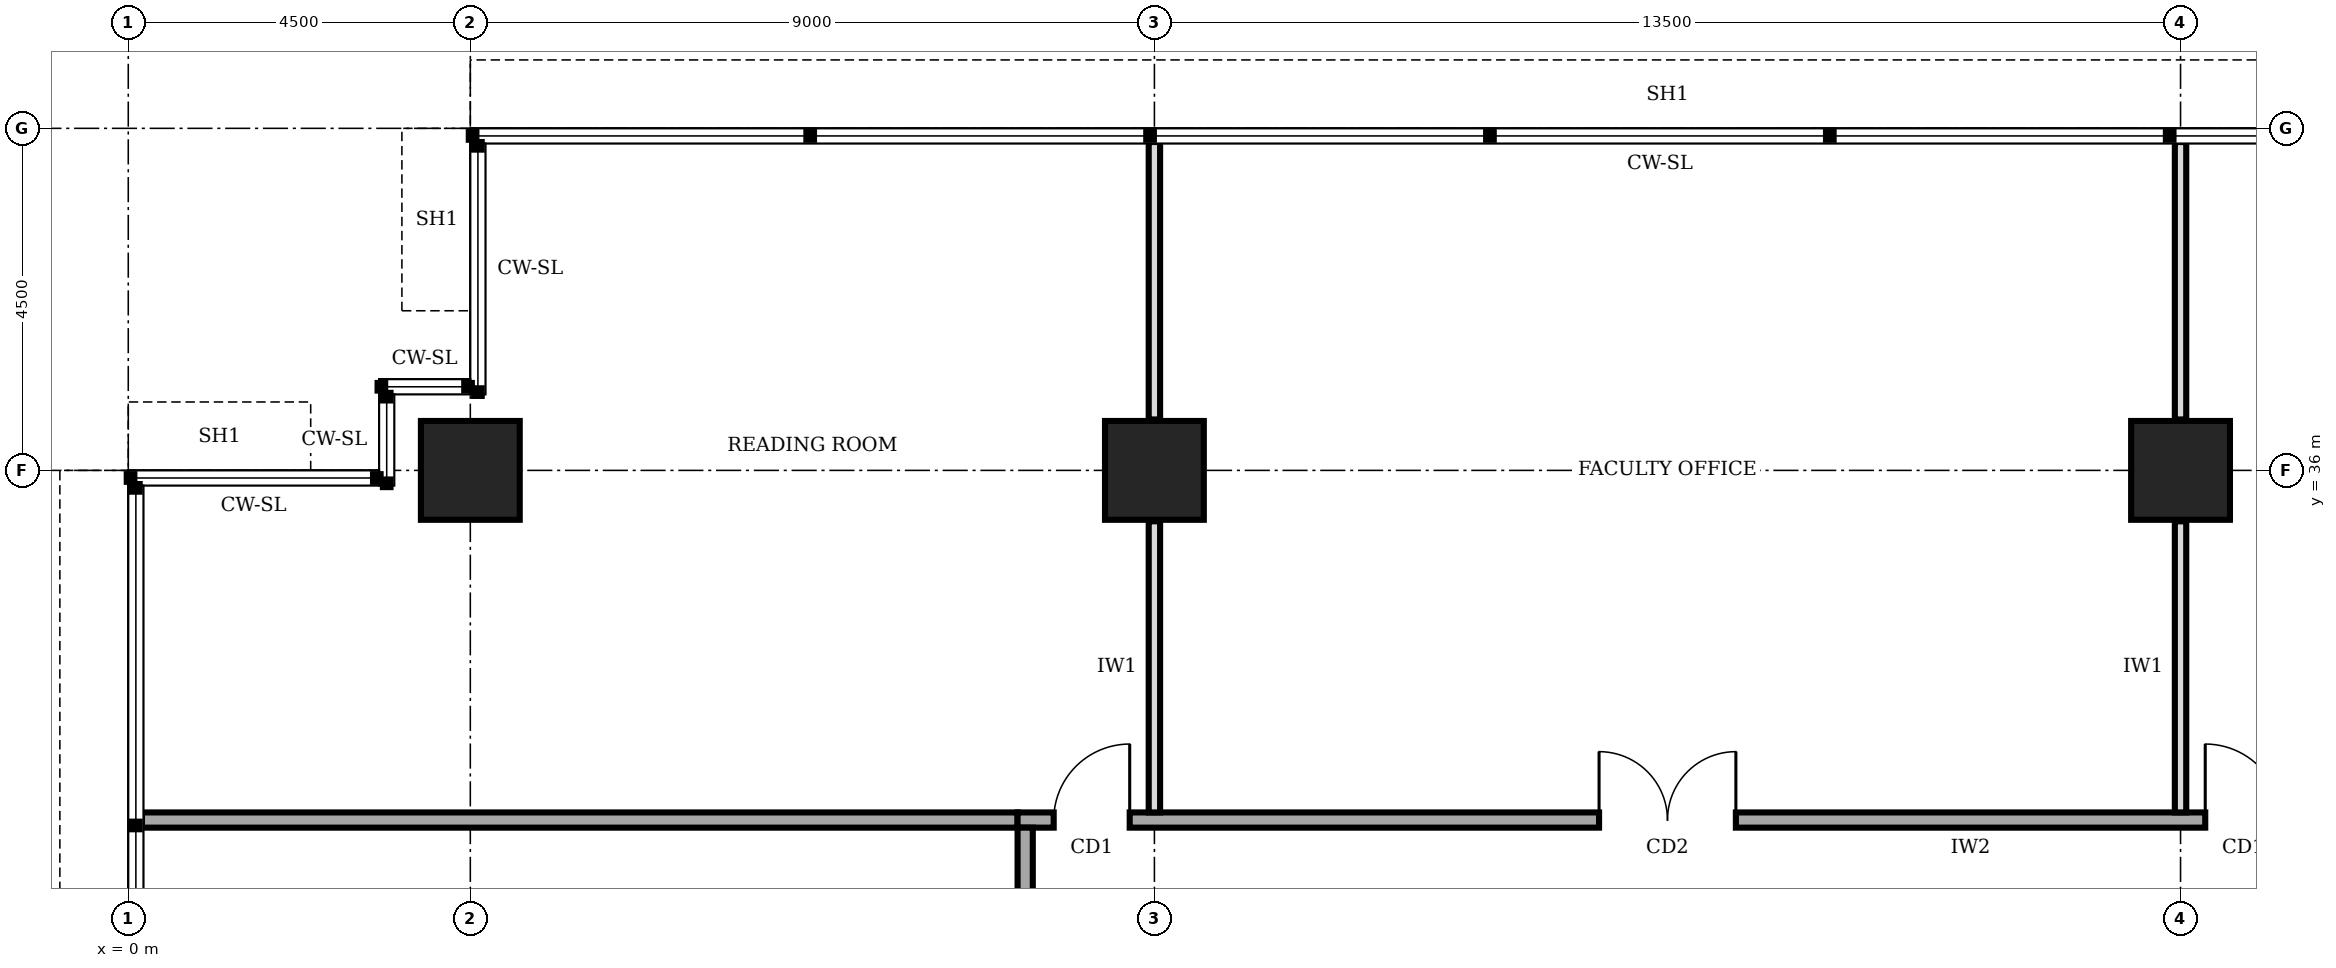
"""IFC4 building model, lengths in metres.
Left out: names, types, materials, properties, quantities, classifications, styles, units other than length and angle.
Written with IfcOpenShell. Run it as: python <this file> out.ifc"""

import sys

from ifc_helpers import new_model, si_unit, direction, frame, frame_2d, origin, origin_2d, place, context, subcontext, project, spatial, rectangle, extrude, element, fill, save


model = new_model("IFC4")
c1 = context("Model", 3, precision=1e-05, world=origin(), true_north=direction((0.0, 1.0)))
c2 = subcontext(c1, "Body", "Model", "MODEL_VIEW")
j1 = project(units=[si_unit("LENGTHUNIT", "METRE"), si_unit("PLANEANGLEUNIT", "RADIAN")], contexts=[c1])
p1 = place(None, origin())
s1 = spatial("IfcSite", under=j1, at=p1, CompositionType="ELEMENT")
p2 = place(p1, origin())
s2 = spatial("IfcBuilding", under=s1, at=p2, CompositionType="ELEMENT")
p3 = place(p2, frame((0.0, 0.0, 293.0)))
s3 = spatial("IfcBuildingStorey", under=s2, at=p3, CompositionType="ELEMENT", Elevation=293.0)
for number, where, z_axis, x_axis in (
    (1, (4.5, 36.0, 0.0), (0.0, 0.0, 1.0), (1.0, 0.0, 0.0)),
    (2, (13.5, 36.0, 0.0), (0.0, 0.0, 1.0), (1.0, 0.0, 0.0)),
    (3, (27.0, 36.0, 0.0), (0.0, 0.0, 1.0), (1.0, 0.0, 0.0)),
):
    element("IfcColumn", number, at=place(p3, frame(where, z_axis=z_axis, x_axis=x_axis)), inside=s3, PredefinedType="COLUMN", context=c2, shape_type="SweptSolid", body=[
        extrude(rectangle(XDim=1.3, YDim=1.3, at=origin_2d()), origin(), (0.0, 0.0, 1.0), 4.0),
    ])
p4 = place(p3, frame((28.6, 31.4, 0.0), z_axis=(0.0, 0.0, 1.0), x_axis=(-1.0, 0.0, 0.0)))
e4 = element("IfcWall", 4, at=p4, inside=s3, PredefinedType="SOLIDWALL", context=c2, shape_type="SweptSolid", body=[
    extrude(rectangle(XDim=16.9, YDim=0.2, at=frame_2d((8.45, 0.0))), origin(), (0.0, 0.0, 1.0), 3.75),
])
p5 = place(p4, frame((15.425, 0.0, 0.0)))
e5 = element("IfcOpeningElement", 5, at=p5, cuts=e4, PredefinedType="OPENING", context=c2, shape_type="SweptSolid", body=[
    extrude(rectangle(XDim=1.0, YDim=2.1, at=frame_2d((0.5, 1.05))), frame((0.0, 0.11, 0.0), z_axis=(0.0, -1.0, 0.0), x_axis=(1.0, 0.0, 0.0)), (0.0, 0.0, 1.0), 0.22),
])
p6 = place(p4, frame((7.45, 0.0, 0.0)))
e6 = element("IfcOpeningElement", 6, at=p6, cuts=e4, PredefinedType="OPENING", context=c2, shape_type="SweptSolid", body=[
    extrude(rectangle(XDim=1.8, YDim=2.1, at=frame_2d((0.9, 1.05))), frame((0.0, 0.11, 0.0), z_axis=(0.0, -1.0, 0.0), x_axis=(1.0, 0.0, 0.0)), (0.0, 0.0, 1.0), 0.22),
])
p7 = place(p4, frame((0.275, 0.0, 0.0)))
e7 = element("IfcOpeningElement", 7, at=p7, cuts=e4, PredefinedType="OPENING", context=c2, shape_type="SweptSolid", body=[
    extrude(rectangle(XDim=1.0, YDim=2.1, at=frame_2d((0.5, 1.05))), frame((0.0, 0.11, 0.0), z_axis=(0.0, -1.0, 0.0), x_axis=(1.0, 0.0, 0.0)), (0.0, 0.0, 1.0), 0.22),
])
p8 = place(p3, frame((11.8, 31.3, 0.0), z_axis=(0.0, 0.0, 1.0), x_axis=(0.0, -1.0, 0.0)))
e8 = element("IfcWall", 8, at=p8, inside=s3, PredefinedType="SOLIDWALL", context=c2, shape_type="SweptSolid", body=[
    extrude(rectangle(XDim=22.3, YDim=0.2, at=frame_2d((11.15, 0.0))), origin(), (0.0, 0.0, 1.0), 3.75),
])
p9 = place(p8, frame((19.55, 0.0, 0.0)))
e9 = element("IfcOpeningElement", 9, at=p9, cuts=e8, PredefinedType="OPENING", context=c2, shape_type="SweptSolid", body=[
    extrude(rectangle(XDim=1.0, YDim=2.1, at=frame_2d((0.5, 1.05))), frame((0.0, 0.11, 0.0), z_axis=(0.0, -1.0, 0.0), x_axis=(1.0, 0.0, 0.0)), (0.0, 0.0, 1.0), 0.22),
])
p10 = place(p8, frame((15.45, 0.0, 0.0)))
e10 = element("IfcOpeningElement", 10, at=p10, cuts=e8, PredefinedType="OPENING", context=c2, shape_type="SweptSolid", body=[
    extrude(rectangle(XDim=0.9, YDim=2.1, at=frame_2d((0.45, 1.05))), frame((0.0, 0.11, 0.0), z_axis=(0.0, -1.0, 0.0), x_axis=(1.0, 0.0, 0.0)), (0.0, 0.0, 1.0), 0.22),
])
p11 = place(p8, frame((12.45, 0.0, 0.0)))
e11 = element("IfcOpeningElement", 11, at=p11, cuts=e8, PredefinedType="OPENING", context=c2, shape_type="SweptSolid", body=[
    extrude(rectangle(XDim=0.9, YDim=2.1, at=frame_2d((0.45, 1.05))), frame((0.0, 0.11, 0.0), z_axis=(0.0, -1.0, 0.0), x_axis=(1.0, 0.0, 0.0)), (0.0, 0.0, 1.0), 0.22),
])
p12 = place(p8, frame((7.6, 0.0, 0.0)))
e12 = element("IfcOpeningElement", 12, at=p12, cuts=e8, PredefinedType="OPENING", context=c2, shape_type="SweptSolid", body=[
    extrude(rectangle(XDim=0.9, YDim=2.1, at=frame_2d((0.45, 1.05))), frame((0.0, 0.11, 0.0), z_axis=(0.0, -1.0, 0.0), x_axis=(1.0, 0.0, 0.0)), (0.0, 0.0, 1.0), 0.22),
])
p13 = place(p8, frame((4.8, 0.0, 0.0)))
e13 = element("IfcOpeningElement", 13, at=p13, cuts=e8, PredefinedType="OPENING", context=c2, shape_type="SweptSolid", body=[
    extrude(rectangle(XDim=1.0, YDim=2.1, at=frame_2d((0.5, 1.05))), frame((0.0, 0.11, 0.0), z_axis=(0.0, -1.0, 0.0), x_axis=(1.0, 0.0, 0.0)), (0.0, 0.0, 1.0), 0.22),
])
p14 = place(p8, frame((10.3, 0.0, 0.0)))
e14 = element("IfcOpeningElement", 14, at=p14, cuts=e8, PredefinedType="OPENING", context=c2, shape_type="SweptSolid", body=[
    extrude(rectangle(XDim=1.0, YDim=2.1, at=frame_2d((0.5, 1.05))), frame((0.0, 0.11, 0.0), z_axis=(0.0, -1.0, 0.0), x_axis=(1.0, 0.0, 0.0)), (0.0, 0.0, 1.0), 0.22),
])
p15 = place(p8, frame((1.55, 0.0, 0.0)))
e15 = element("IfcOpeningElement", 15, at=p15, cuts=e8, PredefinedType="OPENING", context=c2, shape_type="SweptSolid", body=[
    extrude(rectangle(XDim=1.0, YDim=2.1, at=frame_2d((0.5, 1.05))), frame((0.0, 0.11, 0.0), z_axis=(0.0, -1.0, 0.0), x_axis=(1.0, 0.0, 0.0)), (0.0, 0.0, 1.0), 0.22),
])
p16 = place(p3, frame((0.18, 31.4, 0.0), z_axis=(0.0, 0.0, 1.0), x_axis=(1.0, 0.0, 0.0)))
e16 = element("IfcWall", 16, at=p16, inside=s3, PredefinedType="SOLIDWALL", context=c2, shape_type="SweptSolid", body=[
    extrude(rectangle(XDim=11.52, YDim=0.2, at=frame_2d((5.76, 0.0))), origin(), (0.0, 0.0, 1.0), 3.75),
])
p17 = place(p3, frame((13.5, 31.5, 0.0), z_axis=(0.0, 0.0, 1.0), x_axis=(0.0, 1.0, 0.0)))
e17 = element("IfcWall", 17, at=p17, inside=s3, PredefinedType="PARTITIONING", context=c2, shape_type="SweptSolid", body=[
    extrude(rectangle(XDim=3.83, YDim=0.15, at=frame_2d((1.915, 0.0))), origin(), (0.0, 0.0, 1.0), 2.85),
])
p18 = place(p3, frame((13.5, 36.67, 0.0), z_axis=(0.0, 0.0, 1.0), x_axis=(0.0, 1.0, 0.0)))
e18 = element("IfcWall", 18, at=p18, inside=s3, PredefinedType="PARTITIONING", context=c2, shape_type="SweptSolid", body=[
    extrude(rectangle(XDim=3.65, YDim=0.15, at=frame_2d((1.825, 0.0))), origin(), (0.0, 0.0, 1.0), 2.85),
])
p19 = place(p3, frame((27.0, 31.5, 0.0), z_axis=(0.0, 0.0, 1.0), x_axis=(0.0, 1.0, 0.0)))
e19 = element("IfcWall", 19, at=p19, inside=s3, PredefinedType="PARTITIONING", context=c2, shape_type="SweptSolid", body=[
    extrude(rectangle(XDim=3.83, YDim=0.15, at=frame_2d((1.915, 0.0))), origin(), (0.0, 0.0, 1.0), 2.85),
])
p20 = place(p3, frame((27.0, 36.67, 0.0), z_axis=(0.0, 0.0, 1.0), x_axis=(0.0, 1.0, 0.0)))
e20 = element("IfcWall", 20, at=p20, inside=s3, PredefinedType="PARTITIONING", context=c2, shape_type="SweptSolid", body=[
    extrude(rectangle(XDim=3.65, YDim=0.15, at=frame_2d((1.825, 0.0))), origin(), (0.0, 0.0, 1.0), 2.85),
])
p21 = place(p5, frame((1.0, 0.0, 0.0), z_axis=(0.0, 0.0, 1.0), x_axis=(-1.0, 0.0, 0.0)))
e21 = element("IfcDoor", 21, at=p21, inside=s3, OperationType="SINGLE_SWING_RIGHT", PredefinedType="DOOR", context=c2, shape_type="SweptSolid", body=[
    extrude(rectangle(XDim=1.0, YDim=2.1, at=frame_2d((0.5, 1.05))), frame((0.0, 0.025, 0.0), z_axis=(0.0, -1.0, 0.0), x_axis=(1.0, 0.0, 0.0)), (0.0, 0.0, 1.0), 0.05),
])
fill(e5, e21)
p22 = place(p6, frame((1.8, 0.0, 0.0), z_axis=(0.0, 0.0, 1.0), x_axis=(-1.0, 0.0, 0.0)))
e22 = element("IfcDoor", 22, at=p22, inside=s3, OperationType="DOUBLE_DOOR_SINGLE_SWING", PredefinedType="DOOR", context=c2, shape_type="SweptSolid", body=[
    extrude(rectangle(XDim=1.8, YDim=2.1, at=frame_2d((0.9, 1.05))), frame((0.0, 0.025, 0.0), z_axis=(0.0, -1.0, 0.0), x_axis=(1.0, 0.0, 0.0)), (0.0, 0.0, 1.0), 0.05),
])
fill(e6, e22)
p23 = place(p7, frame((1.0, 0.0, 0.0), z_axis=(0.0, 0.0, 1.0), x_axis=(-1.0, 0.0, 0.0)))
e23 = element("IfcDoor", 23, at=p23, inside=s3, OperationType="SINGLE_SWING_LEFT", PredefinedType="DOOR", context=c2, shape_type="SweptSolid", body=[
    extrude(rectangle(XDim=1.0, YDim=2.1, at=frame_2d((0.5, 1.05))), frame((0.0, 0.025, 0.0), z_axis=(0.0, -1.0, 0.0), x_axis=(1.0, 0.0, 0.0)), (0.0, 0.0, 1.0), 0.05),
])
fill(e7, e23)
save(model, sys.argv[1])
